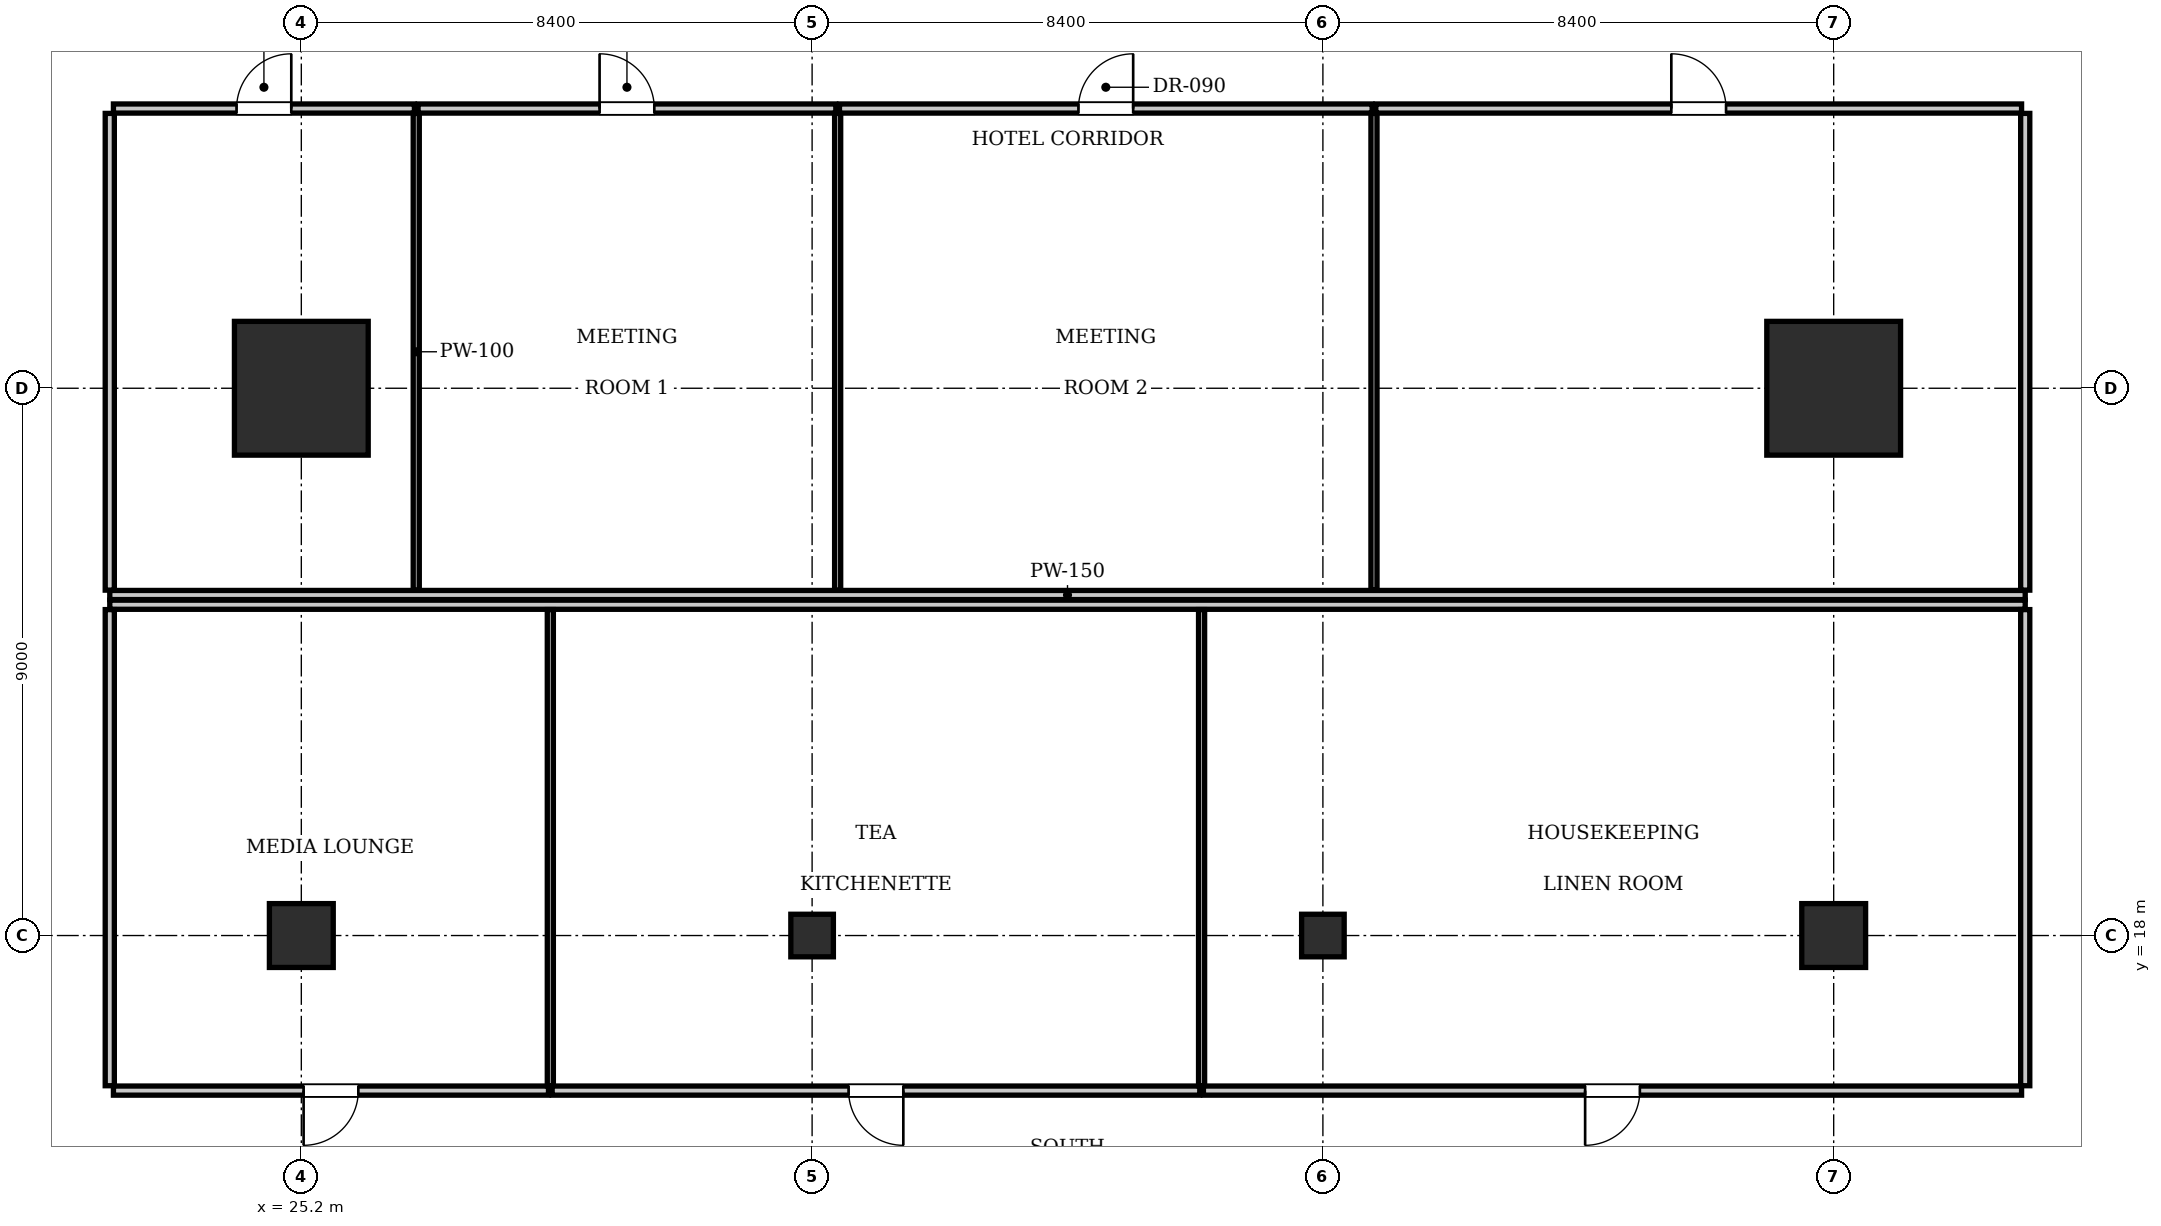
"""IFC4 building model, lengths in metres.
Left out: names, types, materials, properties, quantities, classifications, styles, units other than length and angle.
Written with IfcOpenShell. Run it as: python <this file> out.ifc"""

import sys

from ifc_helpers import new_model, si_unit, direction, frame, frame_2d, origin, origin_2d, place, context, subcontext, project, spatial, rectangle, i_section, extrude, element, fill, save


model = new_model("IFC4")
c1 = context("Model", 3, precision=1e-05, world=origin(), true_north=direction((0.0, 1.0)))
c2 = subcontext(c1, "Body", "Model", "MODEL_VIEW")
j1 = project(units=[si_unit("LENGTHUNIT", "METRE"), si_unit("PLANEANGLEUNIT", "RADIAN")], contexts=[c1])
p1 = place(None, origin())
s1 = spatial("IfcSite", under=j1, at=p1, CompositionType="ELEMENT")
p2 = place(p1, origin())
s2 = spatial("IfcBuilding", under=s1, at=p2, CompositionType="ELEMENT")
p3 = place(p2, frame((0.0, 0.0, 77.0)))
s3 = spatial("IfcBuildingStorey", under=s2, at=p3, CompositionType="ELEMENT", Elevation=77.0)
for number, where, z_axis, x_axis in (
    (1, (25.2, 27.0, 0.0), (0.0, 0.0, 1.0), (1.0, 0.0, 0.0)),
    (2, (50.4, 27.0, 0.0), (0.0, 0.0, 1.0), (1.0, 0.0, 0.0)),
):
    element("IfcColumn", number, at=place(p3, frame(where, z_axis=z_axis, x_axis=x_axis)), inside=s3, PredefinedType="COLUMN", context=c2, shape_type="SweptSolid", body=[
        extrude(rectangle(XDim=2.2, YDim=2.2, at=origin_2d()), origin(), (0.0, 0.0, 1.0), 3.85),
    ])
for number, where, z_axis, x_axis in (
    (3, (25.2, 18.0, 0.0), (0.0, 0.0, 1.0), (1.0, 0.0, 0.0)),
    (4, (50.4, 18.0, 0.0), (0.0, 0.0, 1.0), (1.0, 0.0, 0.0)),
):
    element("IfcColumn", number, at=place(p3, frame(where, z_axis=z_axis, x_axis=x_axis)), inside=s3, PredefinedType="COLUMN", context=c2, shape_type="SweptSolid", body=[
        extrude(rectangle(XDim=1.05, YDim=1.05, at=origin_2d()), origin(), (0.0, 0.0, 1.0), 3.85),
    ])
for number, where, z_axis, x_axis in (
    (5, (33.6, 18.0, 0.0), (0.0, 0.0, 1.0), (1.0, 0.0, 0.0)),
    (6, (42.0, 18.0, 0.0), (0.0, 0.0, 1.0), (1.0, 0.0, 0.0)),
):
    element("IfcColumn", number, at=place(p3, frame(where, z_axis=z_axis, x_axis=x_axis)), inside=s3, PredefinedType="COLUMN", context=c2, shape_type="SweptSolid", body=[
        extrude(i_section(OverallWidth=0.7, OverallDepth=0.7, WebThickness=0.028, FlangeThickness=0.044, at=origin_2d()), origin(), (0.0, 0.0, 1.0), 3.85),
    ])
p4 = place(p3, frame((22.05, 23.6, 0.0), z_axis=(0.0, 0.0, 1.0), x_axis=(1.0, 0.0, 0.0)))
e7 = element("IfcWall", 7, at=p4, inside=s3, PredefinedType="PARTITIONING", context=c2, shape_type="SweptSolid", body=[
    extrude(rectangle(XDim=31.5, YDim=0.15, at=frame_2d((15.75, 0.0))), origin(), (0.0, 0.0, 1.0), 3.61),
])
for number, where, z_axis, x_axis in (
    (8, (22.05, 23.68, 0.0), (0.0, 0.0, 1.0), (0.0, 1.0, 0.0)),
    (9, (53.55, 23.68, 0.0), (0.0, 0.0, 1.0), (0.0, 1.0, 0.0)),
):
    element("IfcWall", number, at=place(p3, frame(where, z_axis=z_axis, x_axis=x_axis)), inside=s3, PredefinedType="PARTITIONING", context=c2, shape_type="SweptSolid", body=[
        extrude(rectangle(XDim=7.84, YDim=0.15, at=frame_2d((3.92, 0.0))), origin(), (0.0, 0.0, 1.0), 3.61),
    ])
p5 = place(p3, frame((22.11, 31.6, 0.0), z_axis=(0.0, 0.0, 1.0), x_axis=(1.0, 0.0, 0.0)))
e10 = element("IfcWall", 10, at=p5, inside=s3, PredefinedType="PARTITIONING", context=c2, shape_type="SweptSolid", body=[
    extrude(rectangle(XDim=4.95, YDim=0.15, at=frame_2d((2.475, 0.0))), origin(), (0.0, 0.0, 1.0), 3.61),
])
p6 = place(p5, frame((2.025, 0.0, 0.0)))
e11 = element("IfcOpeningElement", 11, at=p6, cuts=e10, PredefinedType="OPENING", context=c2, shape_type="SweptSolid", body=[
    extrude(rectangle(XDim=0.9, YDim=2.1, at=frame_2d((0.45, 1.05))), frame((0.0, 0.085, 0.0), z_axis=(0.0, -1.0, 0.0), x_axis=(1.0, 0.0, 0.0)), (0.0, 0.0, 1.0), 0.17),
])
p7 = place(p3, frame((27.09, 23.68, 0.0), z_axis=(0.0, 0.0, 1.0), x_axis=(0.0, 1.0, 0.0)))
e12 = element("IfcWall", 12, at=p7, inside=s3, PredefinedType="PARTITIONING", context=c2, shape_type="SweptSolid", body=[
    extrude(rectangle(XDim=7.84, YDim=0.1, at=frame_2d((3.92, 0.0))), origin(), (0.0, 0.0, 1.0), 3.61),
])
p8 = place(p3, frame((27.12, 31.6, 0.0), z_axis=(0.0, 0.0, 1.0), x_axis=(1.0, 0.0, 0.0)))
e13 = element("IfcWall", 13, at=p8, inside=s3, PredefinedType="PARTITIONING", context=c2, shape_type="SweptSolid", body=[
    extrude(rectangle(XDim=6.87, YDim=0.15, at=frame_2d((3.435, 0.0))), origin(), (0.0, 0.0, 1.0), 3.61),
])
p9 = place(p8, frame((2.985, 0.0, 0.0)))
e14 = element("IfcOpeningElement", 14, at=p9, cuts=e13, PredefinedType="OPENING", context=c2, shape_type="SweptSolid", body=[
    extrude(rectangle(XDim=0.9, YDim=2.1, at=frame_2d((0.45, 1.05))), frame((0.0, 0.085, 0.0), z_axis=(0.0, -1.0, 0.0), x_axis=(1.0, 0.0, 0.0)), (0.0, 0.0, 1.0), 0.17),
])
p10 = place(p3, frame((34.02, 23.68, 0.0), z_axis=(0.0, 0.0, 1.0), x_axis=(0.0, 1.0, 0.0)))
e15 = element("IfcWall", 15, at=p10, inside=s3, PredefinedType="PARTITIONING", context=c2, shape_type="SweptSolid", body=[
    extrude(rectangle(XDim=7.84, YDim=0.1, at=frame_2d((3.92, 0.0))), origin(), (0.0, 0.0, 1.0), 3.61),
])
p11 = place(p3, frame((34.05, 31.6, 0.0), z_axis=(0.0, 0.0, 1.0), x_axis=(1.0, 0.0, 0.0)))
e16 = element("IfcWall", 16, at=p11, inside=s3, PredefinedType="PARTITIONING", context=c2, shape_type="SweptSolid", body=[
    extrude(rectangle(XDim=8.76, YDim=0.15, at=frame_2d((4.38, 0.0))), origin(), (0.0, 0.0, 1.0), 3.61),
])
p12 = place(p11, frame((3.93, 0.0, 0.0)))
e17 = element("IfcOpeningElement", 17, at=p12, cuts=e16, PredefinedType="OPENING", context=c2, shape_type="SweptSolid", body=[
    extrude(rectangle(XDim=0.9, YDim=2.1, at=frame_2d((0.45, 1.05))), frame((0.0, 0.085, 0.0), z_axis=(0.0, -1.0, 0.0), x_axis=(1.0, 0.0, 0.0)), (0.0, 0.0, 1.0), 0.17),
])
p13 = place(p3, frame((42.84, 23.68, 0.0), z_axis=(0.0, 0.0, 1.0), x_axis=(0.0, 1.0, 0.0)))
e18 = element("IfcWall", 18, at=p13, inside=s3, PredefinedType="PARTITIONING", context=c2, shape_type="SweptSolid", body=[
    extrude(rectangle(XDim=7.84, YDim=0.1, at=frame_2d((3.92, 0.0))), origin(), (0.0, 0.0, 1.0), 3.61),
])
p14 = place(p3, frame((42.87, 31.6, 0.0), z_axis=(0.0, 0.0, 1.0), x_axis=(1.0, 0.0, 0.0)))
e19 = element("IfcWall", 19, at=p14, inside=s3, PredefinedType="PARTITIONING", context=c2, shape_type="SweptSolid", body=[
    extrude(rectangle(XDim=10.62, YDim=0.15, at=frame_2d((5.31, 0.0))), origin(), (0.0, 0.0, 1.0), 3.61),
])
p15 = place(p14, frame((4.86, 0.0, 0.0)))
e20 = element("IfcOpeningElement", 20, at=p15, cuts=e19, PredefinedType="OPENING", context=c2, shape_type="SweptSolid", body=[
    extrude(rectangle(XDim=0.9, YDim=2.1, at=frame_2d((0.45, 1.05))), frame((0.0, 0.085, 0.0), z_axis=(0.0, -1.0, 0.0), x_axis=(1.0, 0.0, 0.0)), (0.0, 0.0, 1.0), 0.17),
])
p16 = place(p3, frame((22.05, 23.44, 0.0), z_axis=(0.0, 0.0, 1.0), x_axis=(1.0, 0.0, 0.0)))
e21 = element("IfcWall", 21, at=p16, inside=s3, PredefinedType="PARTITIONING", context=c2, shape_type="SweptSolid", body=[
    extrude(rectangle(XDim=31.5, YDim=0.15, at=frame_2d((15.75, 0.0))), origin(), (0.0, 0.0, 1.0), 3.61),
])
for number, where, z_axis, x_axis in (
    (22, (22.05, 15.53, 0.0), (0.0, 0.0, 1.0), (0.0, 1.0, 0.0)),
    (23, (53.55, 15.53, 0.0), (0.0, 0.0, 1.0), (0.0, 1.0, 0.0)),
):
    element("IfcWall", number, at=place(p3, frame(where, z_axis=z_axis, x_axis=x_axis)), inside=s3, PredefinedType="PARTITIONING", context=c2, shape_type="SweptSolid", body=[
        extrude(rectangle(XDim=7.83, YDim=0.15, at=frame_2d((3.915, 0.0))), origin(), (0.0, 0.0, 1.0), 3.61),
    ])
p17 = place(p3, frame((22.11, 15.45, 0.0), z_axis=(0.0, 0.0, 1.0), x_axis=(1.0, 0.0, 0.0)))
e24 = element("IfcWall", 24, at=p17, inside=s3, PredefinedType="PARTITIONING", context=c2, shape_type="SweptSolid", body=[
    extrude(rectangle(XDim=7.155, YDim=0.15, at=frame_2d((3.577, 0.0))), origin(), (0.0, 0.0, 1.0), 3.61),
])
p18 = place(p17, frame((3.127, 0.0, 0.0)))
e25 = element("IfcOpeningElement", 25, at=p18, cuts=e24, PredefinedType="OPENING", context=c2, shape_type="SweptSolid", body=[
    extrude(rectangle(XDim=0.9, YDim=2.1, at=frame_2d((0.45, 1.05))), frame((0.0, 0.085, 0.0), z_axis=(0.0, -1.0, 0.0), x_axis=(1.0, 0.0, 0.0)), (0.0, 0.0, 1.0), 0.17),
])
p19 = place(p3, frame((29.295, 15.53, 0.0), z_axis=(0.0, 0.0, 1.0), x_axis=(0.0, 1.0, 0.0)))
e26 = element("IfcWall", 26, at=p19, inside=s3, PredefinedType="PARTITIONING", context=c2, shape_type="SweptSolid", body=[
    extrude(rectangle(XDim=7.83, YDim=0.1, at=frame_2d((3.915, 0.0))), origin(), (0.0, 0.0, 1.0), 3.207),
])
p20 = place(p3, frame((29.325, 15.45, 0.0), z_axis=(0.0, 0.0, 1.0), x_axis=(1.0, 0.0, 0.0)))
e27 = element("IfcWall", 27, at=p20, inside=s3, PredefinedType="PARTITIONING", context=c2, shape_type="SweptSolid", body=[
    extrude(rectangle(XDim=10.65, YDim=0.15, at=frame_2d((5.325, 0.0))), origin(), (0.0, 0.0, 1.0), 3.61),
])
p21 = place(p20, frame((4.875, 0.0, 0.0)))
e28 = element("IfcOpeningElement", 28, at=p21, cuts=e27, PredefinedType="OPENING", context=c2, shape_type="SweptSolid", body=[
    extrude(rectangle(XDim=0.9, YDim=2.1, at=frame_2d((0.45, 1.05))), frame((0.0, 0.085, 0.0), z_axis=(0.0, -1.0, 0.0), x_axis=(1.0, 0.0, 0.0)), (0.0, 0.0, 1.0), 0.17),
])
p22 = place(p3, frame((40.005, 15.53, 0.0), z_axis=(0.0, 0.0, 1.0), x_axis=(0.0, 1.0, 0.0)))
e29 = element("IfcWall", 29, at=p22, inside=s3, PredefinedType="PARTITIONING", context=c2, shape_type="SweptSolid", body=[
    extrude(rectangle(XDim=7.83, YDim=0.1, at=frame_2d((3.915, 0.0))), origin(), (0.0, 0.0, 1.0), 3.61),
])
p23 = place(p3, frame((40.035, 15.45, 0.0), z_axis=(0.0, 0.0, 1.0), x_axis=(1.0, 0.0, 0.0)))
e30 = element("IfcWall", 30, at=p23, inside=s3, PredefinedType="PARTITIONING", context=c2, shape_type="SweptSolid", body=[
    extrude(rectangle(XDim=13.455, YDim=0.15, at=frame_2d((6.728, 0.0))), origin(), (0.0, 0.0, 1.0), 3.61),
])
p24 = place(p23, frame((6.278, 0.0, 0.0)))
e31 = element("IfcOpeningElement", 31, at=p24, cuts=e30, PredefinedType="OPENING", context=c2, shape_type="SweptSolid", body=[
    extrude(rectangle(XDim=0.9, YDim=2.1, at=frame_2d((0.45, 1.05))), frame((0.0, 0.085, 0.0), z_axis=(0.0, -1.0, 0.0), x_axis=(1.0, 0.0, 0.0)), (0.0, 0.0, 1.0), 0.17),
])
p25 = place(p6, origin())
e32 = element("IfcDoor", 32, at=p25, inside=s3, OperationType="SINGLE_SWING_RIGHT", PredefinedType="DOOR", context=c2, shape_type="SweptSolid", body=[
    extrude(rectangle(XDim=0.9, YDim=2.1, at=frame_2d((0.45, 1.05))), frame((0.0, 0.025, 0.0), z_axis=(0.0, -1.0, 0.0), x_axis=(1.0, 0.0, 0.0)), (0.0, 0.0, 1.0), 0.05),
])
fill(e11, e32)
p26 = place(p9, origin())
e33 = element("IfcDoor", 33, at=p26, inside=s3, OperationType="SINGLE_SWING_LEFT", PredefinedType="DOOR", context=c2, shape_type="SweptSolid", body=[
    extrude(rectangle(XDim=0.9, YDim=2.1, at=frame_2d((0.45, 1.05))), frame((0.0, 0.025, 0.0), z_axis=(0.0, -1.0, 0.0), x_axis=(1.0, 0.0, 0.0)), (0.0, 0.0, 1.0), 0.05),
])
fill(e14, e33)
p27 = place(p12, origin())
e34 = element("IfcDoor", 34, at=p27, inside=s3, OperationType="SINGLE_SWING_RIGHT", PredefinedType="DOOR", context=c2, shape_type="SweptSolid", body=[
    extrude(rectangle(XDim=0.9, YDim=2.1, at=frame_2d((0.45, 1.05))), frame((0.0, 0.025, 0.0), z_axis=(0.0, -1.0, 0.0), x_axis=(1.0, 0.0, 0.0)), (0.0, 0.0, 1.0), 0.05),
])
fill(e17, e34)
p28 = place(p15, origin())
e35 = element("IfcDoor", 35, at=p28, inside=s3, OperationType="SINGLE_SWING_LEFT", PredefinedType="DOOR", context=c2, shape_type="SweptSolid", body=[
    extrude(rectangle(XDim=0.9, YDim=2.1, at=frame_2d((0.45, 1.05))), frame((0.0, 0.025, 0.0), z_axis=(0.0, -1.0, 0.0), x_axis=(1.0, 0.0, 0.0)), (0.0, 0.0, 1.0), 0.05),
])
fill(e20, e35)
p29 = place(p18, frame((0.9, 0.0, 0.0), z_axis=(0.0, 0.0, 1.0), x_axis=(-1.0, 0.0, 0.0)))
e36 = element("IfcDoor", 36, at=p29, inside=s3, OperationType="SINGLE_SWING_RIGHT", PredefinedType="DOOR", context=c2, shape_type="SweptSolid", body=[
    extrude(rectangle(XDim=0.9, YDim=2.1, at=frame_2d((0.45, 1.05))), frame((0.0, 0.025, 0.0), z_axis=(0.0, -1.0, 0.0), x_axis=(1.0, 0.0, 0.0)), (0.0, 0.0, 1.0), 0.05),
])
fill(e25, e36)
p30 = place(p21, frame((0.9, 0.0, 0.0), z_axis=(0.0, 0.0, 1.0), x_axis=(-1.0, 0.0, 0.0)))
e37 = element("IfcDoor", 37, at=p30, inside=s3, OperationType="SINGLE_SWING_LEFT", PredefinedType="DOOR", context=c2, shape_type="SweptSolid", body=[
    extrude(rectangle(XDim=0.9, YDim=2.1, at=frame_2d((0.45, 1.05))), frame((0.0, 0.025, 0.0), z_axis=(0.0, -1.0, 0.0), x_axis=(1.0, 0.0, 0.0)), (0.0, 0.0, 1.0), 0.05),
])
fill(e28, e37)
p31 = place(p24, frame((0.9, 0.0, 0.0), z_axis=(0.0, 0.0, 1.0), x_axis=(-1.0, 0.0, 0.0)))
e38 = element("IfcDoor", 38, at=p31, inside=s3, OperationType="SINGLE_SWING_RIGHT", PredefinedType="DOOR", context=c2, shape_type="SweptSolid", body=[
    extrude(rectangle(XDim=0.9, YDim=2.1, at=frame_2d((0.45, 1.05))), frame((0.0, 0.025, 0.0), z_axis=(0.0, -1.0, 0.0), x_axis=(1.0, 0.0, 0.0)), (0.0, 0.0, 1.0), 0.05),
])
fill(e31, e38)
save(model, sys.argv[1])
